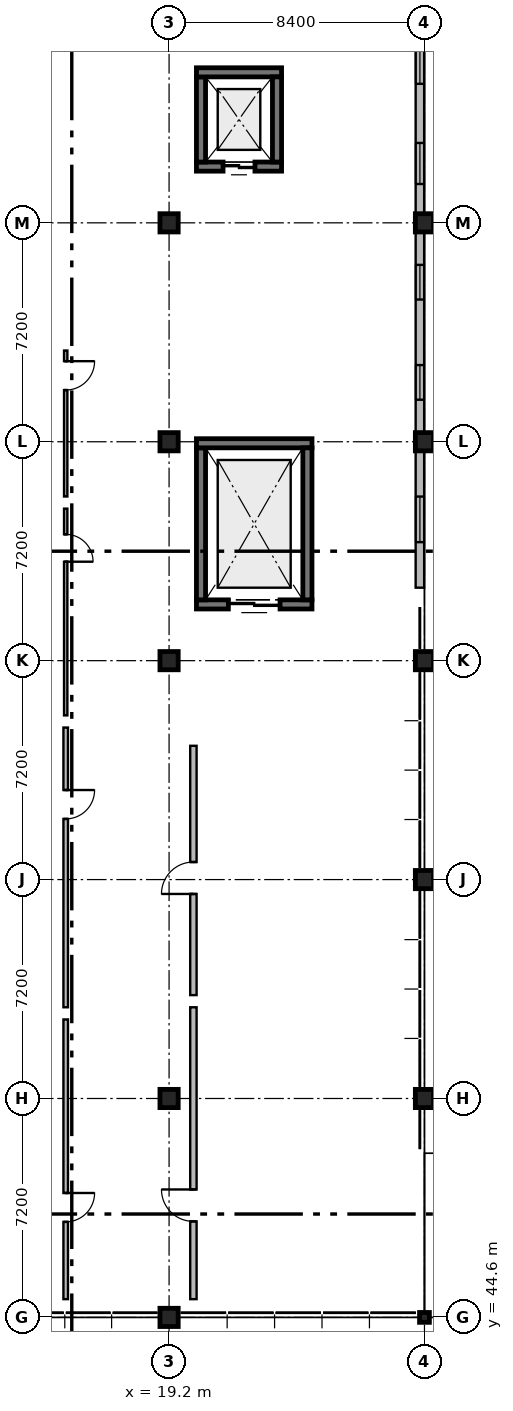
"""IFC4 building model, lengths in metres.
Left out: names, types, materials, properties, quantities, classifications, styles, units other than length and angle.
Written with IfcOpenShell. Run it as: python <this file> out.ifc"""

import sys

from ifc_helpers import new_model, si_unit, direction, frame, frame_2d, origin, origin_2d, place, context, subcontext, project, spatial, rectangle, hollow_circle, extrude, element, fill, save


model = new_model("IFC4")
c1 = context("Model", 3, precision=1e-05, world=origin(), true_north=direction((0.0, 1.0)))
c2 = subcontext(c1, "Body", "Model", "MODEL_VIEW")
j1 = project(units=[si_unit("LENGTHUNIT", "METRE"), si_unit("PLANEANGLEUNIT", "RADIAN")], contexts=[c1])
p1 = place(None, origin())
s1 = spatial("IfcSite", under=j1, at=p1, CompositionType="ELEMENT")
p2 = place(p1, origin())
s2 = spatial("IfcBuilding", under=s1, at=p2, CompositionType="ELEMENT")
p3 = place(p2, frame((0.0, 0.0, 4.8)))
s3 = spatial("IfcBuildingStorey", under=s2, at=p3, CompositionType="ELEMENT", Elevation=4.8)
for number, where, z_axis, x_axis in (
    (1, (19.2, 44.6, 0.0), (0.0, 0.0, 1.0), (1.0, 0.0, 0.0)),
    (2, (19.2, 51.8, 0.0), (0.0, 0.0, 1.0), (1.0, 0.0, 0.0)),
    (3, (19.2, 66.2, 0.0), (0.0, 0.0, 1.0), (1.0, 0.0, 0.0)),
    (4, (19.2, 73.4, 0.0), (0.0, 0.0, 1.0), (1.0, 0.0, 0.0)),
    (5, (19.2, 80.6, 0.0), (0.0, 0.0, 1.0), (1.0, 0.0, 0.0)),
):
    element("IfcColumn", number, at=place(p3, frame(where, z_axis=z_axis, x_axis=x_axis)), inside=s3, PredefinedType="COLUMN", context=c2, shape_type="SweptSolid", body=[
        extrude(rectangle(XDim=0.6, YDim=0.6, at=origin_2d()), origin(), (0.0, 0.0, 1.0), 4.2),
    ])
p4 = place(p3, frame((27.6, 44.6, 0.0), z_axis=(0.0, 0.0, 1.0), x_axis=(1.0, 0.0, 0.0)))
e6 = element("IfcColumn", 6, at=p4, inside=s3, PredefinedType="COLUMN", context=c2, shape_type="SweptSolid", body=[
    extrude(hollow_circle(Radius=0.162, WallThickness=0.012, at=origin_2d()), origin(), (0.0, 0.0, 1.0), 4.2),
])
for number, where, z_axis, x_axis in (
    (7, (27.6, 51.8, 0.0), (0.0, 0.0, 1.0), (1.0, 0.0, 0.0)),
    (8, (27.6, 59.0, 0.0), (0.0, 0.0, 1.0), (1.0, 0.0, 0.0)),
    (9, (27.6, 66.2, 0.0), (0.0, 0.0, 1.0), (1.0, 0.0, 0.0)),
    (10, (27.6, 73.4, 0.0), (0.0, 0.0, 1.0), (1.0, 0.0, 0.0)),
    (11, (27.6, 80.6, 0.0), (0.0, 0.0, 1.0), (1.0, 0.0, 0.0)),
):
    element("IfcColumn", number, at=place(p3, frame(where, z_axis=z_axis, x_axis=x_axis)), inside=s3, PredefinedType="COLUMN", context=c2, shape_type="SweptSolid", body=[
        extrude(rectangle(XDim=0.6, YDim=0.6, at=origin_2d()), origin(), (0.0, 0.0, 1.0), 4.2),
    ])
p5 = place(p3, frame((22.9, 82.45, 0.0), z_axis=(0.0, 0.0, 1.0), x_axis=(-1.0, 0.0, 0.0)))
e12 = element("IfcWall", 12, at=p5, inside=s3, PredefinedType="SOLIDWALL", context=c2, shape_type="SweptSolid", body=[
    extrude(rectangle(XDim=2.8, YDim=0.3, at=frame_2d((1.4, 0.0))), origin(), (0.0, 0.0, 1.0), 4.2),
])
p6 = place(p5, frame((0.875, 0.0, 0.0)))
e13 = element("IfcOpeningElement", 13, at=p6, cuts=e12, PredefinedType="OPENING", context=c2, shape_type="SweptSolid", body=[
    extrude(rectangle(XDim=1.05, YDim=2.15, at=frame_2d((0.525, 1.075))), frame((0.0, 0.17, 0.0), z_axis=(0.0, -1.0, 0.0), x_axis=(1.0, 0.0, 0.0)), (0.0, 0.0, 1.0), 0.34),
])
for number, where, z_axis, x_axis in (
    (14, (20.25, 82.6, 0.0), (0.0, 0.0, 1.0), (0.0, 1.0, 0.0)),
    (15, (20.1, 85.55, 0.0), (0.0, 0.0, 1.0), (1.0, 0.0, 0.0)),
    (16, (22.75, 85.4, 0.0), (0.0, 0.0, 1.0), (0.0, -1.0, 0.0)),
):
    element("IfcWall", number, at=place(p3, frame(where, z_axis=z_axis, x_axis=x_axis)), inside=s3, PredefinedType="SOLIDWALL", context=c2, shape_type="SweptSolid", body=[
        extrude(rectangle(XDim=2.8, YDim=0.3, at=frame_2d((1.4, 0.0))), origin(), (0.0, 0.0, 1.0), 4.2),
    ])
p7 = place(p3, frame((23.9, 68.05, 0.0), z_axis=(0.0, 0.0, 1.0), x_axis=(-1.0, 0.0, 0.0)))
e17 = element("IfcWall", 17, at=p7, inside=s3, PredefinedType="SOLIDWALL", context=c2, shape_type="SweptSolid", body=[
    extrude(rectangle(XDim=3.8, YDim=0.3, at=frame_2d((1.9, 0.0))), origin(), (0.0, 0.0, 1.0), 4.2),
])
p8 = place(p7, frame((1.05, 0.0, 0.0)))
e18 = element("IfcOpeningElement", 18, at=p8, cuts=e17, PredefinedType="OPENING", context=c2, shape_type="SweptSolid", body=[
    extrude(rectangle(XDim=1.7, YDim=2.4, at=frame_2d((0.85, 1.2))), frame((0.0, 0.17, 0.0), z_axis=(0.0, -1.0, 0.0), x_axis=(1.0, 0.0, 0.0)), (0.0, 0.0, 1.0), 0.34),
])
p9 = place(p3, frame((20.25, 68.2, 0.0), z_axis=(0.0, 0.0, 1.0), x_axis=(0.0, 1.0, 0.0)))
e19 = element("IfcWall", 19, at=p9, inside=s3, PredefinedType="SOLIDWALL", context=c2, shape_type="SweptSolid", body=[
    extrude(rectangle(XDim=5.0, YDim=0.3, at=frame_2d((2.5, 0.0))), origin(), (0.0, 0.0, 1.0), 4.2),
])
p10 = place(p3, frame((20.1, 73.35, 0.0), z_axis=(0.0, 0.0, 1.0), x_axis=(1.0, 0.0, 0.0)))
e20 = element("IfcWall", 20, at=p10, inside=s3, PredefinedType="SOLIDWALL", context=c2, shape_type="SweptSolid", body=[
    extrude(rectangle(XDim=3.8, YDim=0.3, at=frame_2d((1.9, 0.0))), origin(), (0.0, 0.0, 1.0), 4.2),
])
p11 = place(p3, frame((23.75, 73.2, 0.0), z_axis=(0.0, 0.0, 1.0), x_axis=(0.0, -1.0, 0.0)))
e21 = element("IfcWall", 21, at=p11, inside=s3, PredefinedType="SOLIDWALL", context=c2, shape_type="SweptSolid", body=[
    extrude(rectangle(XDim=5.0, YDim=0.3, at=frame_2d((2.5, 0.0))), origin(), (0.0, 0.0, 1.0), 4.2),
])
p12 = place(p3, frame((27.45, 68.6, 0.0), z_axis=(0.0, 0.0, 1.0), x_axis=(0.0, 1.0, 0.0)))
e22 = element("IfcWall", 22, at=p12, inside=s3, PredefinedType="SOLIDWALL", context=c2, shape_type="SweptSolid", body=[
    extrude(rectangle(XDim=4.495, YDim=0.28, at=frame_2d((2.248, 0.0))), origin(), (0.0, 0.0, 1.0), 3.653),
])
p13 = place(p12, frame((1.498, 0.0, 0.95)))
e23 = element("IfcOpeningElement", 23, at=p13, cuts=e22, PredefinedType="OPENING", context=c2, shape_type="SweptSolid", body=[
    extrude(rectangle(XDim=1.5, YDim=1.75, at=frame_2d((0.75, 0.875))), frame((0.0, 0.16, 0.0), z_axis=(0.0, -1.0, 0.0), x_axis=(1.0, 0.0, 0.0)), (0.0, 0.0, 1.0), 0.32),
])
p14 = place(p3, frame((27.45, 73.705, 0.0), z_axis=(0.0, 0.0, 1.0), x_axis=(0.0, 1.0, 0.0)))
e24 = element("IfcWall", 24, at=p14, inside=s3, PredefinedType="SOLIDWALL", context=c2, shape_type="SweptSolid", body=[
    extrude(rectangle(XDim=6.59, YDim=0.28, at=frame_2d((3.295, 0.0))), origin(), (0.0, 0.0, 1.0), 3.653),
])
p15 = place(p14, frame((1.077, 0.0, 0.95)))
e25 = element("IfcOpeningElement", 25, at=p15, cuts=e24, PredefinedType="OPENING", context=c2, shape_type="SweptSolid", body=[
    extrude(rectangle(XDim=1.14, YDim=1.6, at=frame_2d((0.57, 0.8))), frame((0.0, 0.16, 0.0), z_axis=(0.0, -1.0, 0.0), x_axis=(1.0, 0.0, 0.0)), (0.0, 0.0, 1.0), 0.32),
])
p16 = place(p14, frame((4.373, 0.0, 0.95)))
e26 = element("IfcOpeningElement", 26, at=p16, cuts=e24, PredefinedType="OPENING", context=c2, shape_type="SweptSolid", body=[
    extrude(rectangle(XDim=1.14, YDim=1.6, at=frame_2d((0.57, 0.8))), frame((0.0, 0.16, 0.0), z_axis=(0.0, -1.0, 0.0), x_axis=(1.0, 0.0, 0.0)), (0.0, 0.0, 1.0), 0.32),
])
p17 = place(p3, frame((27.45, 80.905, 0.0), z_axis=(0.0, 0.0, 1.0), x_axis=(0.0, 1.0, 0.0)))
e27 = element("IfcWall", 27, at=p17, inside=s3, PredefinedType="SOLIDWALL", context=c2, shape_type="SweptSolid", body=[
    extrude(rectangle(XDim=6.59, YDim=0.28, at=frame_2d((3.295, 0.0))), origin(), (0.0, 0.0, 1.0), 3.653),
])
p18 = place(p17, frame((0.972, 0.0, 0.95)))
e28 = element("IfcOpeningElement", 28, at=p18, cuts=e27, PredefinedType="OPENING", context=c2, shape_type="SweptSolid", body=[
    extrude(rectangle(XDim=1.35, YDim=1.75, at=frame_2d((0.675, 0.875))), frame((0.0, 0.16, 0.0), z_axis=(0.0, -1.0, 0.0), x_axis=(1.0, 0.0, 0.0)), (0.0, 0.0, 1.0), 0.32),
])
p19 = place(p17, frame((4.268, 0.0, 0.95)))
e29 = element("IfcOpeningElement", 29, at=p19, cuts=e27, PredefinedType="OPENING", context=c2, shape_type="SweptSolid", body=[
    extrude(rectangle(XDim=1.35, YDim=1.75, at=frame_2d((0.675, 0.875))), frame((0.0, 0.16, 0.0), z_axis=(0.0, -1.0, 0.0), x_axis=(1.0, 0.0, 0.0)), (0.0, 0.0, 1.0), 0.32),
])
p20 = place(p3, frame((15.8, 54.4, 0.0), z_axis=(0.0, 0.0, 1.0), x_axis=(0.0, -1.0, 0.0)))
e30 = element("IfcWall", 30, at=p20, inside=s3, PredefinedType="PARTITIONING", context=c2, shape_type="SweptSolid", body=[
    extrude(rectangle(XDim=9.2, YDim=0.15, at=frame_2d((4.6, 0.0))), origin(), (0.0, 0.0, 1.0), 3.94),
])
p21 = place(p20, frame((5.708, 0.0, 0.0)))
e31 = element("IfcOpeningElement", 31, at=p21, cuts=e30, PredefinedType="OPENING", context=c2, shape_type="SweptSolid", body=[
    extrude(rectangle(XDim=0.95, YDim=2.2, at=frame_2d((0.475, 1.1))), frame((0.0, 0.095, 0.0), z_axis=(0.0, -1.0, 0.0), x_axis=(1.0, 0.0, 0.0)), (0.0, 0.0, 1.0), 0.19),
])
p22 = place(p3, frame((15.8, 64.0, 0.0), z_axis=(0.0, 0.0, 1.0), x_axis=(0.0, -1.0, 0.0)))
e32 = element("IfcWall", 32, at=p22, inside=s3, PredefinedType="PARTITIONING", context=c2, shape_type="SweptSolid", body=[
    extrude(rectangle(XDim=9.2, YDim=0.15, at=frame_2d((4.6, 0.0))), origin(), (0.0, 0.0, 1.0), 3.94),
])
p23 = place(p22, frame((2.055, 0.0, 0.0)))
e33 = element("IfcOpeningElement", 33, at=p23, cuts=e32, PredefinedType="OPENING", context=c2, shape_type="SweptSolid", body=[
    extrude(rectangle(XDim=0.95, YDim=2.2, at=frame_2d((0.475, 1.1))), frame((0.0, 0.095, 0.0), z_axis=(0.0, -1.0, 0.0), x_axis=(1.0, 0.0, 0.0)), (0.0, 0.0, 1.0), 0.19),
])
p24 = place(p3, frame((20.0, 45.2, 0.0), z_axis=(0.0, 0.0, 1.0), x_axis=(0.0, 1.0, 0.0)))
e34 = element("IfcWall", 34, at=p24, inside=s3, PredefinedType="PARTITIONING", context=c2, shape_type="SweptSolid", body=[
    extrude(rectangle(XDim=9.6, YDim=0.21, at=frame_2d((4.8, 0.0))), origin(), (0.0, 0.0, 1.0), 3.94),
])
p25 = place(p24, frame((2.558, 0.0, 0.0)))
e35 = element("IfcOpeningElement", 35, at=p25, cuts=e34, PredefinedType="OPENING", context=c2, shape_type="SweptSolid", body=[
    extrude(rectangle(XDim=1.05, YDim=2.25, at=frame_2d((0.525, 1.125))), frame((0.0, 0.125, 0.0), z_axis=(0.0, -1.0, 0.0), x_axis=(1.0, 0.0, 0.0)), (0.0, 0.0, 1.0), 0.25),
])
p26 = place(p3, frame((20.0, 55.2, 0.0), z_axis=(0.0, 0.0, 1.0), x_axis=(0.0, 1.0, 0.0)))
e36 = element("IfcWall", 36, at=p26, inside=s3, PredefinedType="PARTITIONING", context=c2, shape_type="SweptSolid", body=[
    extrude(rectangle(XDim=8.2, YDim=0.21, at=frame_2d((4.1, 0.0))), origin(), (0.0, 0.0, 1.0), 3.94),
])
p27 = place(p26, frame((3.327, 0.0, 0.0)))
e37 = element("IfcOpeningElement", 37, at=p27, cuts=e36, PredefinedType="OPENING", context=c2, shape_type="SweptSolid", body=[
    extrude(rectangle(XDim=1.05, YDim=2.25, at=frame_2d((0.525, 1.125))), frame((0.0, 0.125, 0.0), z_axis=(0.0, -1.0, 0.0), x_axis=(1.0, 0.0, 0.0)), (0.0, 0.0, 1.0), 0.25),
])
p28 = place(p3, frame((15.8, 71.2, 0.0), z_axis=(0.0, 0.0, 1.0), x_axis=(0.0, -1.0, 0.0)))
e38 = element("IfcWall", 38, at=p28, inside=s3, PredefinedType="PARTITIONING", context=c2, shape_type="SweptSolid", body=[
    extrude(rectangle(XDim=6.8, YDim=0.11, at=frame_2d((3.4, 0.0))), origin(), (0.0, 0.0, 1.0), 3.94),
])
p29 = place(p28, frame((0.845, 0.0, 0.0)))
e39 = element("IfcOpeningElement", 39, at=p29, cuts=e38, PredefinedType="OPENING", context=c2, shape_type="SweptSolid", body=[
    extrude(rectangle(XDim=0.9, YDim=2.15, at=frame_2d((0.45, 1.075))), frame((0.0, 0.075, 0.0), z_axis=(0.0, -1.0, 0.0), x_axis=(1.0, 0.0, 0.0)), (0.0, 0.0, 1.0), 0.15),
])
p30 = place(p3, frame((15.8, 76.4, 0.0), z_axis=(0.0, 0.0, 1.0), x_axis=(0.0, -1.0, 0.0)))
e40 = element("IfcWall", 40, at=p30, inside=s3, PredefinedType="PARTITIONING", context=c2, shape_type="SweptSolid", body=[
    extrude(rectangle(XDim=4.8, YDim=0.11, at=frame_2d((2.4, 0.0))), origin(), (0.0, 0.0, 1.0), 3.94),
])
p31 = place(p30, frame((0.35, 0.0, 0.0)))
e41 = element("IfcOpeningElement", 41, at=p31, cuts=e40, PredefinedType="OPENING", context=c2, shape_type="SweptSolid", body=[
    extrude(rectangle(XDim=0.95, YDim=2.1, at=frame_2d((0.475, 1.05))), frame((0.0, 0.075, 0.0), z_axis=(0.0, -1.0, 0.0), x_axis=(1.0, 0.0, 0.0)), (0.0, 0.0, 1.0), 0.15),
])
p32 = place(p6, origin())
e42 = element("IfcDoor", 42, at=p32, inside=s3, OperationType="DOUBLE_DOOR_SLIDING", PredefinedType="DOOR", context=c2, shape_type="SweptSolid", body=[
    extrude(rectangle(XDim=1.05, YDim=2.15, at=frame_2d((0.525, 1.075))), frame((0.0, 0.025, 0.0), z_axis=(0.0, -1.0, 0.0), x_axis=(1.0, 0.0, 0.0)), (0.0, 0.0, 1.0), 0.05),
])
fill(e13, e42)
p33 = place(p8, origin())
e43 = element("IfcDoor", 43, at=p33, inside=s3, OperationType="DOUBLE_DOOR_SLIDING", PredefinedType="DOOR", context=c2, shape_type="SweptSolid", body=[
    extrude(rectangle(XDim=1.7, YDim=2.4, at=frame_2d((0.85, 1.2))), frame((0.0, 0.025, 0.0), z_axis=(0.0, -1.0, 0.0), x_axis=(1.0, 0.0, 0.0)), (0.0, 0.0, 1.0), 0.05),
])
fill(e18, e43)
p34 = place(p13, origin())
e44 = element("IfcWindow", 44, at=p34, inside=s3, PartitioningType="SINGLE_PANEL", PredefinedType="WINDOW", context=c2, shape_type="SweptSolid", body=[
    extrude(rectangle(XDim=1.5, YDim=1.75, at=frame_2d((0.75, 0.875))), frame((0.0, 0.03, 0.0), z_axis=(0.0, -1.0, 0.0), x_axis=(1.0, 0.0, 0.0)), (0.0, 0.0, 1.0), 0.06),
])
fill(e23, e44)
p35 = place(p15, origin())
e45 = element("IfcWindow", 45, at=p35, inside=s3, PartitioningType="SINGLE_PANEL", PredefinedType="WINDOW", context=c2, shape_type="SweptSolid", body=[
    extrude(rectangle(XDim=1.14, YDim=1.6, at=frame_2d((0.57, 0.8))), frame((0.0, 0.03, 0.0), z_axis=(0.0, -1.0, 0.0), x_axis=(1.0, 0.0, 0.0)), (0.0, 0.0, 1.0), 0.06),
])
fill(e25, e45)
p36 = place(p16, origin())
e46 = element("IfcWindow", 46, at=p36, inside=s3, PartitioningType="SINGLE_PANEL", PredefinedType="WINDOW", context=c2, shape_type="SweptSolid", body=[
    extrude(rectangle(XDim=1.14, YDim=1.6, at=frame_2d((0.57, 0.8))), frame((0.0, 0.03, 0.0), z_axis=(0.0, -1.0, 0.0), x_axis=(1.0, 0.0, 0.0)), (0.0, 0.0, 1.0), 0.06),
])
fill(e26, e46)
p37 = place(p18, origin())
e47 = element("IfcWindow", 47, at=p37, inside=s3, PartitioningType="SINGLE_PANEL", PredefinedType="WINDOW", context=c2, shape_type="SweptSolid", body=[
    extrude(rectangle(XDim=1.35, YDim=1.75, at=frame_2d((0.675, 0.875))), frame((0.0, 0.03, 0.0), z_axis=(0.0, -1.0, 0.0), x_axis=(1.0, 0.0, 0.0)), (0.0, 0.0, 1.0), 0.06),
])
fill(e28, e47)
p38 = place(p19, origin())
e48 = element("IfcWindow", 48, at=p38, inside=s3, PartitioningType="SINGLE_PANEL", PredefinedType="WINDOW", context=c2, shape_type="SweptSolid", body=[
    extrude(rectangle(XDim=1.35, YDim=1.75, at=frame_2d((0.675, 0.875))), frame((0.0, 0.03, 0.0), z_axis=(0.0, -1.0, 0.0), x_axis=(1.0, 0.0, 0.0)), (0.0, 0.0, 1.0), 0.06),
])
fill(e29, e48)
p39 = place(p21, origin())
e49 = element("IfcDoor", 49, at=p39, inside=s3, OperationType="SINGLE_SWING_LEFT", PredefinedType="DOOR", context=c2, shape_type="SweptSolid", body=[
    extrude(rectangle(XDim=0.95, YDim=2.2, at=frame_2d((0.475, 1.1))), frame((0.0, 0.025, 0.0), z_axis=(0.0, -1.0, 0.0), x_axis=(1.0, 0.0, 0.0)), (0.0, 0.0, 1.0), 0.05),
])
fill(e31, e49)
p40 = place(p23, origin())
e50 = element("IfcDoor", 50, at=p40, inside=s3, OperationType="SINGLE_SWING_LEFT", PredefinedType="DOOR", context=c2, shape_type="SweptSolid", body=[
    extrude(rectangle(XDim=0.95, YDim=2.2, at=frame_2d((0.475, 1.1))), frame((0.0, 0.025, 0.0), z_axis=(0.0, -1.0, 0.0), x_axis=(1.0, 0.0, 0.0)), (0.0, 0.0, 1.0), 0.05),
])
fill(e33, e50)
p41 = place(p25, origin())
e51 = element("IfcDoor", 51, at=p41, inside=s3, OperationType="SINGLE_SWING_RIGHT", PredefinedType="DOOR", context=c2, shape_type="SweptSolid", body=[
    extrude(rectangle(XDim=1.05, YDim=2.25, at=frame_2d((0.525, 1.125))), frame((0.0, 0.025, 0.0), z_axis=(0.0, -1.0, 0.0), x_axis=(1.0, 0.0, 0.0)), (0.0, 0.0, 1.0), 0.05),
])
fill(e35, e51)
p42 = place(p27, origin())
e52 = element("IfcDoor", 52, at=p42, inside=s3, OperationType="SINGLE_SWING_LEFT", PredefinedType="DOOR", context=c2, shape_type="SweptSolid", body=[
    extrude(rectangle(XDim=1.05, YDim=2.25, at=frame_2d((0.525, 1.125))), frame((0.0, 0.025, 0.0), z_axis=(0.0, -1.0, 0.0), x_axis=(1.0, 0.0, 0.0)), (0.0, 0.0, 1.0), 0.05),
])
fill(e37, e52)
p43 = place(p29, origin())
e53 = element("IfcDoor", 53, at=p43, inside=s3, OperationType="SINGLE_SWING_RIGHT", PredefinedType="DOOR", context=c2, shape_type="SweptSolid", body=[
    extrude(rectangle(XDim=0.9, YDim=2.15, at=frame_2d((0.45, 1.075))), frame((0.0, 0.025, 0.0), z_axis=(0.0, -1.0, 0.0), x_axis=(1.0, 0.0, 0.0)), (0.0, 0.0, 1.0), 0.05),
])
fill(e39, e53)
p44 = place(p31, origin())
e54 = element("IfcDoor", 54, at=p44, inside=s3, OperationType="SINGLE_SWING_LEFT", PredefinedType="DOOR", context=c2, shape_type="SweptSolid", body=[
    extrude(rectangle(XDim=0.95, YDim=2.1, at=frame_2d((0.475, 1.05))), frame((0.0, 0.025, 0.0), z_axis=(0.0, -1.0, 0.0), x_axis=(1.0, 0.0, 0.0)), (0.0, 0.0, 1.0), 0.05),
])
fill(e41, e54)
save(model, sys.argv[1])
